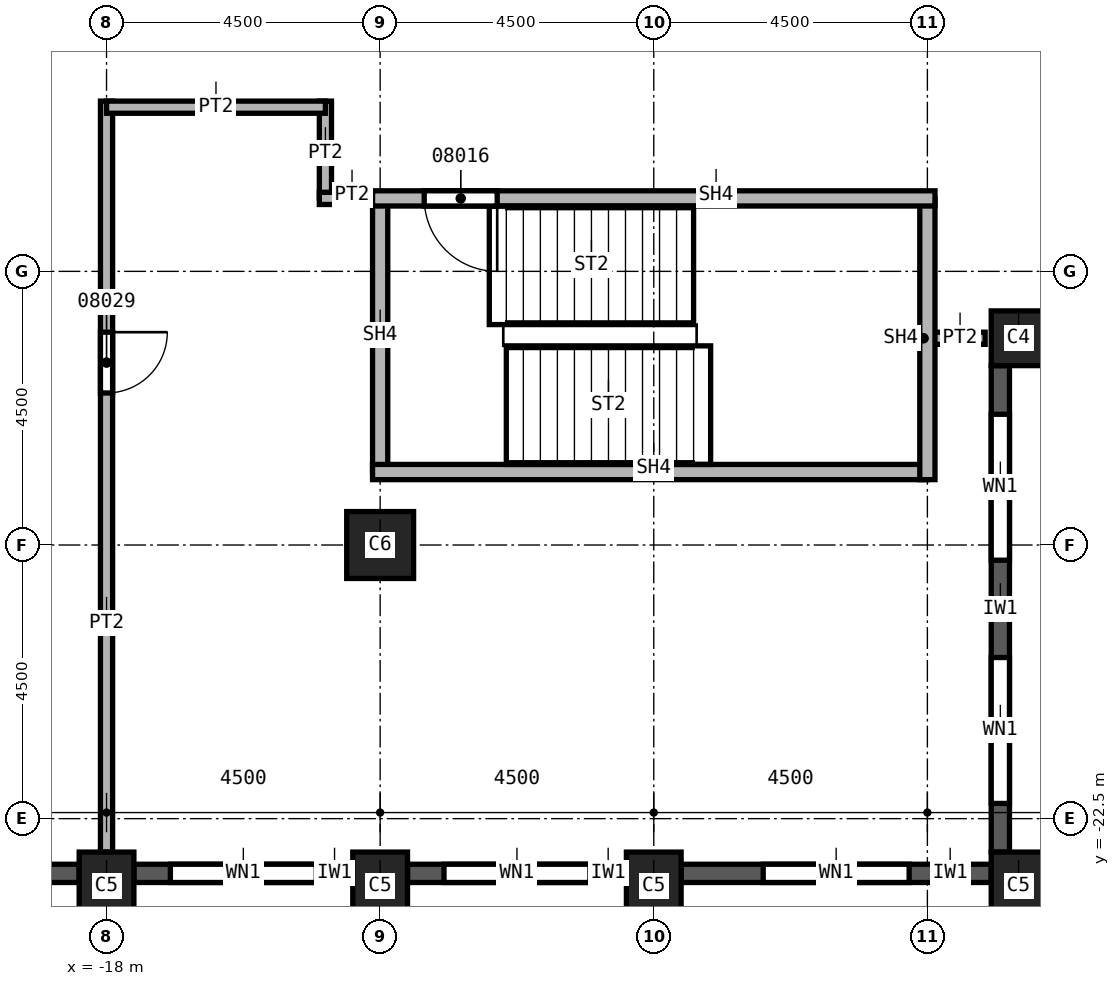
"""IFC4 building model, lengths in metres.
Left out: names, types, materials, properties, quantities, classifications, styles, units other than length and angle.
Written with IfcOpenShell. Run it as: python <this file> out.ifc"""

import sys

from ifc_helpers import new_model, si_unit, direction, frame, frame_2d, origin, origin_2d, place, context, subcontext, project, spatial, rectangle, extrude, element, fill, save


model = new_model("IFC4")
c1 = context("Model", 3, precision=1e-05, world=origin(), true_north=direction((0.0, 1.0)))
c2 = subcontext(c1, "Body", "Model", "MODEL_VIEW")
j1 = project(units=[si_unit("LENGTHUNIT", "METRE"), si_unit("PLANEANGLEUNIT", "RADIAN")], contexts=[c1])
p1 = place(None, origin())
s1 = spatial("IfcSite", under=j1, at=p1, CompositionType="ELEMENT")
p2 = place(p1, origin())
s2 = spatial("IfcBuilding", under=s1, at=p2, CompositionType="ELEMENT")
p3 = place(p2, frame((0.0, 0.0, 150.0)))
s3 = spatial("IfcBuildingStorey", under=s2, at=p3, CompositionType="ELEMENT", Elevation=150.0)
p4 = place(p3, frame((-13.5, -18.0, 0.0), z_axis=(0.0, 0.0, 1.0), x_axis=(1.0, 0.0, 0.0)))
e1 = element("IfcColumn", 1, at=p4, inside=s3, PredefinedType="COLUMN", context=c2, shape_type="SweptSolid", body=[
    extrude(rectangle(XDim=1.1, YDim=1.1, at=origin_2d()), origin(), (0.0, 0.0, 1.0), 3.7),
])
for number, where, z_axis, x_axis in (
    (2, (-3.0, -23.6, 0.0), (0.0, 0.0, 1.0), (1.0, 0.0, 0.0)),
    (3, (-9.0, -23.6, 0.0), (0.0, 0.0, 1.0), (1.0, 0.0, 0.0)),
    (4, (-13.5, -23.6, 0.0), (0.0, 0.0, 1.0), (1.0, 0.0, 0.0)),
    (5, (-18.0, -23.6, 0.0), (0.0, 0.0, 1.0), (1.0, 0.0, 0.0)),
):
    element("IfcColumn", number, at=place(p3, frame(where, z_axis=z_axis, x_axis=x_axis)), inside=s3, PredefinedType="COLUMN", context=c2, shape_type="SweptSolid", body=[
        extrude(rectangle(XDim=0.9, YDim=1.1, at=origin_2d()), origin(), (0.0, 0.0, 1.0), 3.7),
    ])
p5 = place(p3, frame((-3.0, -14.6, 0.0), z_axis=(0.0, 0.0, 1.0), x_axis=(1.0, 0.0, 0.0)))
e6 = element("IfcColumn", 6, at=p5, inside=s3, PredefinedType="COLUMN", context=c2, shape_type="SweptSolid", body=[
    extrude(rectangle(XDim=0.9, YDim=0.9, at=origin_2d()), origin(), (0.0, 0.0, 1.0), 3.7),
])
p6 = place(p3, frame((-22.05, -23.4, 0.0), z_axis=(0.0, 0.0, 1.0), x_axis=(1.0, 0.0, 0.0)))
e7 = element("IfcWall", 7, at=p6, inside=s3, PredefinedType="SOLIDWALL", context=c2, shape_type="SweptSolid", body=[
    extrude(rectangle(XDim=3.6, YDim=0.3, at=frame_2d((1.8, 0.0))), origin(), (0.0, 0.0, 1.0), 3.1),
])
p7 = place(p6, frame((0.775, 0.0, 0.8)))
e8 = element("IfcOpeningElement", 8, at=p7, cuts=e7, PredefinedType="OPENING", context=c2, shape_type="SweptSolid", body=[
    extrude(rectangle(XDim=1.0, YDim=1.95, at=frame_2d((0.5, 0.975))), frame((0.0, 0.15, 0.0), z_axis=(0.0, -1.0, 0.0), x_axis=(1.0, 0.0, 0.0)), (0.0, 0.0, 1.0), 0.3),
])
p8 = place(p6, frame((2.375, 0.0, 0.8)))
e9 = element("IfcOpeningElement", 9, at=p8, cuts=e7, PredefinedType="OPENING", context=c2, shape_type="SweptSolid", body=[
    extrude(rectangle(XDim=0.6, YDim=1.95, at=frame_2d((0.3, 0.975))), frame((0.0, 0.15, 0.0), z_axis=(0.0, -1.0, 0.0), x_axis=(1.0, 0.0, 0.0)), (0.0, 0.0, 1.0), 0.3),
])
p9 = place(p3, frame((-17.55, -23.4, 0.0), z_axis=(0.0, 0.0, 1.0), x_axis=(1.0, 0.0, 0.0)))
e10 = element("IfcWall", 10, at=p9, inside=s3, PredefinedType="SOLIDWALL", context=c2, shape_type="SweptSolid", body=[
    extrude(rectangle(XDim=3.6, YDim=0.3, at=frame_2d((1.8, 0.0))), origin(), (0.0, 0.0, 1.0), 3.1),
])
p10 = place(p9, frame((0.6, 0.0, 0.8)))
e11 = element("IfcOpeningElement", 11, at=p10, cuts=e10, PredefinedType="OPENING", context=c2, shape_type="SweptSolid", body=[
    extrude(rectangle(XDim=2.4, YDim=1.95, at=frame_2d((1.2, 0.975))), frame((0.0, 0.15, 0.0), z_axis=(0.0, -1.0, 0.0), x_axis=(1.0, 0.0, 0.0)), (0.0, 0.0, 1.0), 0.3),
])
p11 = place(p3, frame((-13.05, -23.4, 0.0), z_axis=(0.0, 0.0, 1.0), x_axis=(1.0, 0.0, 0.0)))
e12 = element("IfcWall", 12, at=p11, inside=s3, PredefinedType="SOLIDWALL", context=c2, shape_type="SweptSolid", body=[
    extrude(rectangle(XDim=3.6, YDim=0.3, at=frame_2d((1.8, 0.0))), origin(), (0.0, 0.0, 1.0), 3.1),
])
p12 = place(p11, frame((0.6, 0.0, 0.8)))
e13 = element("IfcOpeningElement", 13, at=p12, cuts=e12, PredefinedType="OPENING", context=c2, shape_type="SweptSolid", body=[
    extrude(rectangle(XDim=2.4, YDim=1.95, at=frame_2d((1.2, 0.975))), frame((0.0, 0.15, 0.0), z_axis=(0.0, -1.0, 0.0), x_axis=(1.0, 0.0, 0.0)), (0.0, 0.0, 1.0), 0.3),
])
p13 = place(p3, frame((-8.55, -23.4, 0.0), z_axis=(0.0, 0.0, 1.0), x_axis=(1.0, 0.0, 0.0)))
e14 = element("IfcWall", 14, at=p13, inside=s3, PredefinedType="SOLIDWALL", context=c2, shape_type="SweptSolid", body=[
    extrude(rectangle(XDim=5.1, YDim=0.3, at=frame_2d((2.55, 0.0))), origin(), (0.0, 0.0, 1.0), 3.1),
])
p14 = place(p13, frame((1.35, 0.0, 0.8)))
e15 = element("IfcOpeningElement", 15, at=p14, cuts=e14, PredefinedType="OPENING", context=c2, shape_type="SweptSolid", body=[
    extrude(rectangle(XDim=2.4, YDim=1.95, at=frame_2d((1.2, 0.975))), frame((0.0, 0.15, 0.0), z_axis=(0.0, -1.0, 0.0), x_axis=(1.0, 0.0, 0.0)), (0.0, 0.0, 1.0), 0.3),
])
p15 = place(p3, frame((-3.3, -23.05, 0.0), z_axis=(0.0, 0.0, 1.0), x_axis=(0.0, 1.0, 0.0)))
e16 = element("IfcWall", 16, at=p15, inside=s3, PredefinedType="SOLIDWALL", context=c2, shape_type="SweptSolid", body=[
    extrude(rectangle(XDim=8.0, YDim=0.3, at=frame_2d((4.0, 0.0))), origin(), (0.0, 0.0, 1.0), 3.1),
])
p16 = place(p15, frame((0.8, 0.0, 0.8)))
e17 = element("IfcOpeningElement", 17, at=p16, cuts=e16, PredefinedType="OPENING", context=c2, shape_type="SweptSolid", body=[
    extrude(rectangle(XDim=2.4, YDim=1.95, at=frame_2d((1.2, 0.975))), frame((0.0, 0.15, 0.0), z_axis=(0.0, -1.0, 0.0), x_axis=(1.0, 0.0, 0.0)), (0.0, 0.0, 1.0), 0.3),
])
p17 = place(p15, frame((4.8, 0.0, 0.8)))
e18 = element("IfcOpeningElement", 18, at=p17, cuts=e16, PredefinedType="OPENING", context=c2, shape_type="SweptSolid", body=[
    extrude(rectangle(XDim=2.4, YDim=1.95, at=frame_2d((1.2, 0.975))), frame((0.0, 0.15, 0.0), z_axis=(0.0, -1.0, 0.0), x_axis=(1.0, 0.0, 0.0)), (0.0, 0.0, 1.0), 0.3),
])
p18 = place(p3, frame((-18.0, -10.7, 0.0), z_axis=(0.0, 0.0, 1.0), x_axis=(0.0, -1.0, 0.0)))
e19 = element("IfcWall", 19, at=p18, inside=s3, PredefinedType="PARTITIONING", context=c2, shape_type="SweptSolid", body=[
    extrude(rectangle(XDim=12.35, YDim=0.2, at=frame_2d((6.175, 0.0))), origin(), (0.0, 0.0, 1.0), 3.7),
])
p19 = place(p18, frame((3.8, 0.0, 0.0)))
e20 = element("IfcOpeningElement", 20, at=p19, cuts=e19, PredefinedType="OPENING", context=c2, shape_type="SweptSolid", body=[
    extrude(rectangle(XDim=1.0, YDim=2.1, at=frame_2d((0.5, 1.05))), frame((0.0, 0.1, 0.0), z_axis=(0.0, -1.0, 0.0), x_axis=(1.0, 0.0, 0.0)), (0.0, 0.0, 1.0), 0.2),
])
p20 = place(p3, frame((-14.4, -12.3, 0.0), z_axis=(0.0, 0.0, 1.0), x_axis=(0.0, 1.0, 0.0)))
e21 = element("IfcWall", 21, at=p20, inside=s3, PredefinedType="PARTITIONING", context=c2, shape_type="SweptSolid", body=[
    extrude(rectangle(XDim=1.6, YDim=0.2, at=frame_2d((0.8, 0.0))), origin(), (0.0, 0.0, 1.0), 3.7),
])
p21 = place(p3, frame((-14.4, -10.8, 0.0), z_axis=(0.0, 0.0, 1.0), x_axis=(-1.0, 0.0, 0.0)))
e22 = element("IfcWall", 22, at=p21, inside=s3, PredefinedType="PARTITIONING", context=c2, shape_type="SweptSolid", body=[
    extrude(rectangle(XDim=3.6, YDim=0.2, at=frame_2d((1.8, 0.0))), origin(), (0.0, 0.0, 1.0), 3.7),
])
p22 = place(p3, frame((-13.375, -12.3, 0.0), z_axis=(0.0, 0.0, 1.0), x_axis=(-1.0, 0.0, 0.0)))
e23 = element("IfcWall", 23, at=p22, inside=s3, PredefinedType="PARTITIONING", context=c2, shape_type="SweptSolid", body=[
    extrude(rectangle(XDim=1.125, YDim=0.2, at=frame_2d((0.562, 0.0))), origin(), (0.0, 0.0, 1.0), 3.7),
])
p23 = place(p3, frame((-3.55, -14.6, 0.0), z_axis=(0.0, 0.0, 1.0), x_axis=(-1.0, 0.0, 0.0)))
e24 = element("IfcWall", 24, at=p23, inside=s3, PredefinedType="PARTITIONING", context=c2, shape_type="SweptSolid", body=[
    extrude(rectangle(XDim=0.95, YDim=0.2, at=frame_2d((0.475, 0.0))), origin(), (0.0, 0.0, 1.0), 3.7),
])
p24 = place(p3, frame((-13.5, -16.8, 0.0), z_axis=(0.0, 0.0, 1.0), x_axis=(0.0, 1.0, 0.0)))
e25 = element("IfcWall", 25, at=p24, inside=s3, PredefinedType="SOLIDWALL", context=c2, shape_type="SweptSolid", body=[
    extrude(rectangle(XDim=4.5, YDim=0.25, at=frame_2d((2.25, 0.0))), origin(), (0.0, 0.0, 1.0), 3.7),
])
p25 = place(p3, frame((-4.5, -16.8, 0.0), z_axis=(0.0, 0.0, 1.0), x_axis=(-1.0, 0.0, 0.0)))
e26 = element("IfcWall", 26, at=p25, inside=s3, PredefinedType="SOLIDWALL", context=c2, shape_type="SweptSolid", body=[
    extrude(rectangle(XDim=9.125, YDim=0.25, at=frame_2d((4.562, 0.0))), origin(), (0.0, 0.0, 1.0), 3.7),
])
p26 = place(p3, frame((-4.5, -12.3, 0.0), z_axis=(0.0, 0.0, 1.0), x_axis=(0.0, -1.0, 0.0)))
e27 = element("IfcWall", 27, at=p26, inside=s3, PredefinedType="SOLIDWALL", context=c2, shape_type="SweptSolid", body=[
    extrude(rectangle(XDim=4.625, YDim=0.25, at=frame_2d((2.312, 0.0))), origin(), (0.0, 0.0, 1.0), 3.7),
])
p27 = place(p3, frame((-4.375, -12.3, 0.0), z_axis=(0.0, 0.0, 1.0), x_axis=(-1.0, 0.0, 0.0)))
e28 = element("IfcWall", 28, at=p27, inside=s3, PredefinedType="SOLIDWALL", context=c2, shape_type="SweptSolid", body=[
    extrude(rectangle(XDim=9.25, YDim=0.25, at=frame_2d((4.625, 0.0))), origin(), (0.0, 0.0, 1.0), 3.7),
])
p28 = place(p27, frame((7.2, 0.0, 0.0)))
e29 = element("IfcOpeningElement", 29, at=p28, cuts=e28, PredefinedType="OPENING", context=c2, shape_type="SweptSolid", body=[
    extrude(rectangle(XDim=1.2, YDim=2.1, at=frame_2d((0.6, 1.05))), frame((0.0, 0.125, 0.0), z_axis=(0.0, -1.0, 0.0), x_axis=(1.0, 0.0, 0.0)), (0.0, 0.0, 1.0), 0.25),
])
p29 = place(p10, origin())
e30 = element("IfcWindow", 30, at=p29, inside=s3, PartitioningType="SINGLE_PANEL", PredefinedType="WINDOW", context=c2, shape_type="SweptSolid", body=[
    extrude(rectangle(XDim=2.4, YDim=1.95, at=frame_2d((1.2, 0.975))), frame((0.0, 0.03, 0.0), z_axis=(0.0, -1.0, 0.0), x_axis=(1.0, 0.0, 0.0)), (0.0, 0.0, 1.0), 0.06),
])
fill(e11, e30)
p30 = place(p12, origin())
e31 = element("IfcWindow", 31, at=p30, inside=s3, PartitioningType="SINGLE_PANEL", PredefinedType="WINDOW", context=c2, shape_type="SweptSolid", body=[
    extrude(rectangle(XDim=2.4, YDim=1.95, at=frame_2d((1.2, 0.975))), frame((0.0, 0.03, 0.0), z_axis=(0.0, -1.0, 0.0), x_axis=(1.0, 0.0, 0.0)), (0.0, 0.0, 1.0), 0.06),
])
fill(e13, e31)
p31 = place(p14, origin())
e32 = element("IfcWindow", 32, at=p31, inside=s3, PartitioningType="SINGLE_PANEL", PredefinedType="WINDOW", context=c2, shape_type="SweptSolid", body=[
    extrude(rectangle(XDim=2.4, YDim=1.95, at=frame_2d((1.2, 0.975))), frame((0.0, 0.03, 0.0), z_axis=(0.0, -1.0, 0.0), x_axis=(1.0, 0.0, 0.0)), (0.0, 0.0, 1.0), 0.06),
])
fill(e15, e32)
p32 = place(p16, origin())
e33 = element("IfcWindow", 33, at=p32, inside=s3, PartitioningType="SINGLE_PANEL", PredefinedType="WINDOW", context=c2, shape_type="SweptSolid", body=[
    extrude(rectangle(XDim=2.4, YDim=1.95, at=frame_2d((1.2, 0.975))), frame((0.0, 0.03, 0.0), z_axis=(0.0, -1.0, 0.0), x_axis=(1.0, 0.0, 0.0)), (0.0, 0.0, 1.0), 0.06),
])
fill(e17, e33)
p33 = place(p17, origin())
e34 = element("IfcWindow", 34, at=p33, inside=s3, PartitioningType="SINGLE_PANEL", PredefinedType="WINDOW", context=c2, shape_type="SweptSolid", body=[
    extrude(rectangle(XDim=2.4, YDim=1.95, at=frame_2d((1.2, 0.975))), frame((0.0, 0.03, 0.0), z_axis=(0.0, -1.0, 0.0), x_axis=(1.0, 0.0, 0.0)), (0.0, 0.0, 1.0), 0.06),
])
fill(e18, e34)
p34 = place(p28, origin())
e35 = element("IfcDoor", 35, at=p34, inside=s3, OperationType="SINGLE_SWING_LEFT", PredefinedType="DOOR", context=c2, shape_type="SweptSolid", body=[
    extrude(rectangle(XDim=1.2, YDim=2.1, at=frame_2d((0.6, 1.05))), frame((0.0, 0.025, 0.0), z_axis=(0.0, -1.0, 0.0), x_axis=(1.0, 0.0, 0.0)), (0.0, 0.0, 1.0), 0.05),
])
fill(e29, e35)
p35 = place(p19, origin())
e36 = element("IfcDoor", 36, at=p35, inside=s3, OperationType="SINGLE_SWING_RIGHT", PredefinedType="DOOR", context=c2, shape_type="SweptSolid", body=[
    extrude(rectangle(XDim=1.0, YDim=2.1, at=frame_2d((0.5, 1.05))), frame((0.0, 0.025, 0.0), z_axis=(0.0, -1.0, 0.0), x_axis=(1.0, 0.0, 0.0)), (0.0, 0.0, 1.0), 0.05),
])
fill(e20, e36)
save(model, sys.argv[1])
